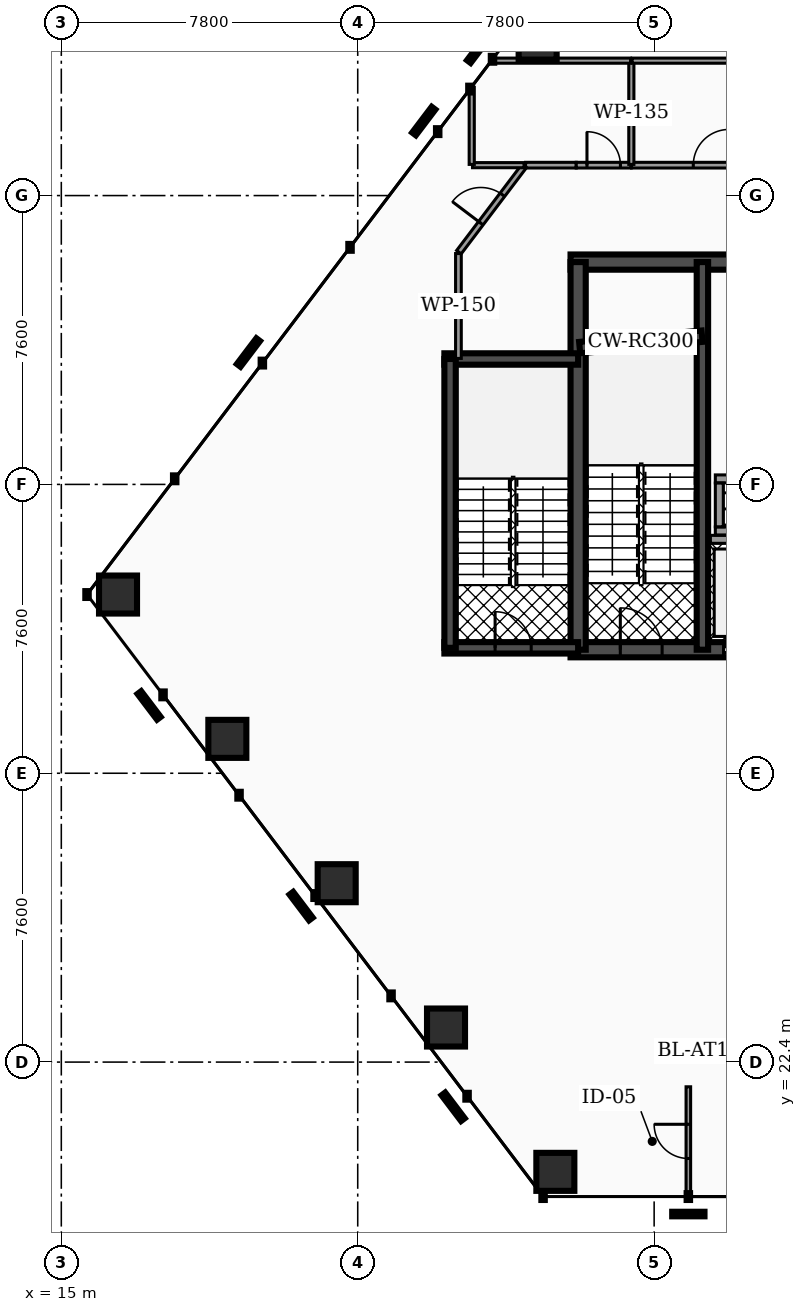
"""IFC4 building model, lengths in metres.
Left out: names, types, materials, properties, quantities, classifications, styles, units other than length and angle.
Written with IfcOpenShell. Run it as: python <this file> out.ifc"""

import sys

from ifc_helpers import new_model, si_unit, direction, frame, frame_2d, origin, origin_2d, place, context, subcontext, project, spatial, rectangle, hollow_rectangle, extrude, element, fill, save


model = new_model("IFC4")
c1 = context("Model", 3, precision=1e-05, world=origin(), true_north=direction((0.0, 1.0)))
c2 = subcontext(c1, "Body", "Model", "MODEL_VIEW")
j1 = project(units=[si_unit("LENGTHUNIT", "METRE"), si_unit("PLANEANGLEUNIT", "RADIAN")], contexts=[c1])
p1 = place(None, origin())
s1 = spatial("IfcSite", under=j1, at=p1, CompositionType="ELEMENT")
p2 = place(p1, origin())
s2 = spatial("IfcBuilding", under=s1, at=p2, CompositionType="ELEMENT")
p3 = place(p2, frame((0.0, 0.0, 56.1)))
s3 = spatial("IfcBuildingStorey", under=s2, at=p3, CompositionType="ELEMENT", Elevation=56.1)
p4 = place(p3, frame((28.4, 43.45, 0.0), z_axis=(0.0, 0.0, 1.0), x_axis=(1.0, 0.0, 0.0)))
e1 = element("IfcWall", 1, at=p4, inside=s3, PredefinedType="SHEAR", context=c2, shape_type="SweptSolid", body=[
    extrude(rectangle(XDim=20.06, YDim=0.4, at=frame_2d((10.03, 0.0))), origin(), (0.0, 0.0, 1.0), 3.82),
])
p5 = place(p3, frame((28.4, 33.25, 0.0), z_axis=(0.0, 0.0, 1.0), x_axis=(1.0, 0.0, 0.0)))
e2 = element("IfcWall", 2, at=p5, inside=s3, PredefinedType="SHEAR", context=c2, shape_type="SweptSolid", body=[
    extrude(rectangle(XDim=20.06, YDim=0.4, at=frame_2d((10.03, 0.0))), origin(), (0.0, 0.0, 1.0), 3.82),
])
p6 = place(p5, frame((4.03, 0.0, 0.0)))
e3 = element("IfcOpeningElement", 3, at=p6, cuts=e2, PredefinedType="OPENING", context=c2, shape_type="SweptSolid", body=[
    extrude(rectangle(XDim=1.1, YDim=2.15, at=frame_2d((0.55, 1.075))), frame((0.0, 0.21, 0.0), z_axis=(0.0, -1.0, 0.0), x_axis=(1.0, 0.0, 0.0)), (0.0, 0.0, 1.0), 0.42),
])
p7 = place(p5, frame((14.87, 0.0, 0.0)))
e4 = element("IfcOpeningElement", 4, at=p7, cuts=e2, PredefinedType="OPENING", context=c2, shape_type="SweptSolid", body=[
    extrude(rectangle(XDim=1.1, YDim=2.15, at=frame_2d((0.55, 1.075))), frame((0.0, 0.21, 0.0), z_axis=(0.0, -1.0, 0.0), x_axis=(1.0, 0.0, 0.0)), (0.0, 0.0, 1.0), 0.42),
])
p8 = place(p5, frame((1.31, 0.0, 0.0)))
e5 = element("IfcOpeningElement", 5, at=p8, cuts=e2, PredefinedType="OPENING", context=c2, shape_type="SweptSolid", body=[
    extrude(rectangle(XDim=1.1, YDim=2.2, at=frame_2d((0.55, 1.1))), frame((0.0, 0.21, 0.0), z_axis=(0.0, -1.0, 0.0), x_axis=(1.0, 0.0, 0.0)), (0.0, 0.0, 1.0), 0.42),
])
p9 = place(p5, frame((9.44, 0.0, 0.0)))
e6 = element("IfcOpeningElement", 6, at=p9, cuts=e2, PredefinedType="OPENING", context=c2, shape_type="SweptSolid", body=[
    extrude(rectangle(XDim=1.12, YDim=2.05, at=frame_2d((0.56, 1.025))), frame((0.0, 0.21, 0.0), z_axis=(0.0, -1.0, 0.0), x_axis=(1.0, 0.0, 0.0)), (0.0, 0.0, 1.0), 0.42),
])
p10 = place(p5, frame((17.65, 0.0, 0.0)))
e7 = element("IfcOpeningElement", 7, at=p10, cuts=e2, PredefinedType="OPENING", context=c2, shape_type="SweptSolid", body=[
    extrude(rectangle(XDim=1.1, YDim=2.2, at=frame_2d((0.55, 1.1))), frame((0.0, 0.21, 0.0), z_axis=(0.0, -1.0, 0.0), x_axis=(1.0, 0.0, 0.0)), (0.0, 0.0, 1.0), 0.42),
])
p11 = place(p3, frame((28.6, 33.25, 0.0), z_axis=(0.0, 0.0, 1.0), x_axis=(0.0, 1.0, 0.0)))
e8 = element("IfcWall", 8, at=p11, inside=s3, PredefinedType="SHEAR", context=c2, shape_type="SweptSolid", body=[
    extrude(rectangle(XDim=10.2, YDim=0.4, at=frame_2d((5.1, 0.0))), origin(), (0.0, 0.0, 1.0), 3.82),
])
p12 = place(p3, frame((31.87, 33.25, 0.0), z_axis=(0.0, 0.0, 1.0), x_axis=(0.0, 1.0, 0.0)))
e9 = element("IfcWall", 9, at=p12, inside=s3, PredefinedType="SHEAR", context=c2, shape_type="SweptSolid", body=[
    extrude(rectangle(XDim=10.2, YDim=0.3, at=frame_2d((5.1, 0.0))), origin(), (0.0, 0.0, 1.0), 3.82),
])
p13 = place(p3, frame((28.64, 41.2, 0.0), z_axis=(0.0, 0.0, 1.0), x_axis=(0.995687118776, 0.092774789157, 0.0)))
e10 = element("IfcWall", 10, at=p13, inside=s3, PredefinedType="SHEAR", context=c2, shape_type="SweptSolid", body=[
    extrude(rectangle(XDim=3.234, YDim=0.3, at=frame_2d((1.617, 0.0))), origin(), (0.0, 0.0, 1.0), 3.82),
])
p14 = place(p3, frame((25.08, 40.9, 0.0), z_axis=(0.0, 0.0, 1.0), x_axis=(1.0, 0.0, 0.0)))
e11 = element("IfcWall", 11, at=p14, inside=s3, PredefinedType="SHEAR", context=c2, shape_type="SweptSolid", body=[
    extrude(rectangle(XDim=3.52, YDim=0.3, at=frame_2d((1.76, 0.0))), origin(), (0.0, 0.0, 1.0), 3.82),
])
p15 = place(p3, frame((25.08, 33.3, 0.0), z_axis=(0.0, 0.0, 1.0), x_axis=(1.0, 0.0, 0.0)))
e12 = element("IfcWall", 12, at=p15, inside=s3, PredefinedType="SHEAR", context=c2, shape_type="SweptSolid", body=[
    extrude(rectangle(XDim=3.52, YDim=0.3, at=frame_2d((1.76, 0.0))), origin(), (0.0, 0.0, 1.0), 3.82),
])
p16 = place(p15, frame((1.335, 0.0, 0.0)))
e13 = element("IfcOpeningElement", 13, at=p16, cuts=e12, PredefinedType="OPENING", context=c2, shape_type="SweptSolid", body=[
    extrude(rectangle(XDim=0.95, YDim=2.2, at=frame_2d((0.475, 1.1))), frame((0.0, 0.16, 0.0), z_axis=(0.0, -1.0, 0.0), x_axis=(1.0, 0.0, 0.0)), (0.0, 0.0, 1.0), 0.32),
])
p17 = place(p3, frame((25.23, 33.3, 0.0), z_axis=(0.0, 0.0, 1.0), x_axis=(0.0, 1.0, 0.0)))
e14 = element("IfcWall", 14, at=p17, inside=s3, PredefinedType="SHEAR", context=c2, shape_type="SweptSolid", body=[
    extrude(rectangle(XDim=7.6, YDim=0.3, at=frame_2d((3.8, 0.0))), origin(), (0.0, 0.0, 1.0), 3.82),
])
for number, where, z_axis, x_axis in (
    (15, (27.534, 49.278, 0.0), (0.0, 0.0, 1.0), (1.0, 0.0, 0.0)),
    (16, (16.492, 34.702, 0.0), (0.0, 0.0, 1.0), (1.0, 0.0, 0.0)),
    (17, (19.369, 30.905, 0.0), (0.0, 0.0, 1.0), (1.0, 0.0, 0.0)),
    (18, (22.246, 27.107, 0.0), (0.0, 0.0, 1.0), (1.0, 0.0, 0.0)),
    (19, (25.123, 23.309, 0.0), (0.0, 0.0, 1.0), (1.0, 0.0, 0.0)),
    (20, (28.0, 19.512, 0.0), (0.0, 0.0, 1.0), (1.0, 0.0, 0.0)),
):
    element("IfcColumn", number, at=place(p3, frame(where, z_axis=z_axis, x_axis=x_axis)), inside=s3, PredefinedType="COLUMN", context=c2, shape_type="SweptSolid", body=[
        extrude(hollow_rectangle(XDim=1.0, YDim=1.0, WallThickness=0.05, at=origin_2d()), origin(), (0.0, 0.0, 1.0), 3.82),
    ])
p18 = place(p3, frame((32.08, 36.155, 0.0), z_axis=(0.0, 0.0, 1.0), x_axis=(1.0, 0.0, 0.0)))
e21 = element("IfcWall", 21, at=p18, inside=s3, PredefinedType="SOLIDWALL", context=c2, shape_type="SweptSolid", body=[
    extrude(rectangle(XDim=1.8, YDim=0.21, at=frame_2d((0.9, 0.0))), origin(), (0.0, 0.0, 1.0), 2.792),
])
for number, where, z_axis, x_axis in (
    (22, (32.21, 36.375, 0.0), (0.0, 0.0, 1.0), (1.0, 0.0, 0.0)),
    (23, (32.21, 37.745, 0.0), (0.0, 0.0, 1.0), (1.0, 0.0, 0.0)),
):
    element("IfcWall", number, at=place(p3, frame(where, z_axis=z_axis, x_axis=x_axis)), inside=s3, PredefinedType="SOLIDWALL", context=c2, shape_type="SweptSolid", body=[
        extrude(rectangle(XDim=1.6, YDim=0.21, at=frame_2d((0.8, 0.0))), origin(), (0.0, 0.0, 1.0), 3.82),
    ])
p19 = place(p3, frame((32.315, 36.485, 0.0), z_axis=(0.0, 0.0, 1.0), x_axis=(0.0, 1.0, 0.0)))
e24 = element("IfcWall", 24, at=p19, inside=s3, PredefinedType="SOLIDWALL", context=c2, shape_type="SweptSolid", body=[
    extrude(rectangle(XDim=1.15, YDim=0.21, at=frame_2d((0.575, 0.0))), origin(), (0.0, 0.0, 1.0), 3.82),
])
p20 = place(p3, frame((27.217, 46.0, 0.0), z_axis=(0.0, 0.0, 1.0), x_axis=(1.0, 0.0, 0.0)))
e25 = element("IfcWall", 25, at=p20, inside=s3, PredefinedType="PARTITIONING", context=c2, shape_type="SweptSolid", body=[
    extrude(rectangle(XDim=1.333, YDim=0.15, at=frame_2d((0.667, 0.0))), origin(), (0.0, 0.0, 1.0), 2.777),
])
p21 = place(p3, frame((28.55, 46.0, 0.0), z_axis=(0.0, 0.0, 1.0), x_axis=(1.0, 0.0, 0.0)))
e26 = element("IfcWall", 26, at=p21, inside=s3, PredefinedType="PARTITIONING", context=c2, shape_type="SweptSolid", body=[
    extrude(rectangle(XDim=1.445, YDim=0.15, at=frame_2d((0.723, 0.0))), origin(), (0.0, 0.0, 1.0), 2.777),
])
p22 = place(p21, frame((0.282, 0.0, 0.0)))
e27 = element("IfcOpeningElement", 27, at=p22, cuts=e26, PredefinedType="OPENING", context=c2, shape_type="SweptSolid", body=[
    extrude(rectangle(XDim=0.88, YDim=2.05, at=frame_2d((0.44, 1.025))), frame((0.0, 0.085, 0.0), z_axis=(0.0, -1.0, 0.0), x_axis=(1.0, 0.0, 0.0)), (0.0, 0.0, 1.0), 0.17),
])
p23 = place(p3, frame((30.005, 46.0, 0.0), z_axis=(0.0, 0.0, 1.0), x_axis=(1.0, 0.0, 0.0)))
e28 = element("IfcWall", 28, at=p23, inside=s3, PredefinedType="PARTITIONING", context=c2, shape_type="SweptSolid", body=[
    extrude(rectangle(XDim=4.19, YDim=0.15, at=frame_2d((2.095, 0.0))), origin(), (0.0, 0.0, 1.0), 2.777),
])
p24 = place(p23, frame((1.625, 0.0, 0.0)))
e29 = element("IfcOpeningElement", 29, at=p24, cuts=e28, PredefinedType="OPENING", context=c2, shape_type="SweptSolid", body=[
    extrude(rectangle(XDim=0.94, YDim=2.05, at=frame_2d((0.47, 1.025))), frame((0.0, 0.085, 0.0), z_axis=(0.0, -1.0, 0.0), x_axis=(1.0, 0.0, 0.0)), (0.0, 0.0, 1.0), 0.17),
])
p25 = place(p3, frame((25.45, 40.915, 0.0), z_axis=(0.0, 0.0, 1.0), x_axis=(0.0, 1.0, 0.0)))
e30 = element("IfcWall", 30, at=p25, inside=s3, PredefinedType="PARTITIONING", context=c2, shape_type="SweptSolid", body=[
    extrude(rectangle(XDim=2.759, YDim=0.15, at=frame_2d((1.38, 0.0))), origin(), (0.0, 0.0, 1.0), 2.777),
])
p26 = place(p3, frame((25.462, 43.71, 0.0), z_axis=(0.0, 0.0, 1.0), x_axis=(0.603800014115, 0.797135837204, 0.0)))
e31 = element("IfcWall", 31, at=p26, inside=s3, PredefinedType="PARTITIONING", context=c2, shape_type="SweptSolid", body=[
    extrude(rectangle(XDim=2.853, YDim=0.15, at=frame_2d((1.426, 0.0))), origin(), (0.0, 0.0, 1.0), 2.777),
])
p27 = place(p26, frame((0.956, 0.0, 0.0)))
e32 = element("IfcOpeningElement", 32, at=p27, cuts=e31, PredefinedType="OPENING", context=c2, shape_type="SweptSolid", body=[
    extrude(rectangle(XDim=0.94, YDim=2.05, at=frame_2d((0.47, 1.025))), frame((0.0, 0.085, 0.0), z_axis=(0.0, -1.0, 0.0), x_axis=(1.0, 0.0, 0.0)), (0.0, 0.0, 1.0), 0.17),
])
p28 = place(p3, frame((30.0, 46.02, 0.0), z_axis=(0.0, 0.0, 1.0), x_axis=(0.0, 1.0, 0.0)))
e33 = element("IfcWall", 33, at=p28, inside=s3, PredefinedType="PARTITIONING", context=c2, shape_type="SweptSolid", body=[
    extrude(rectangle(XDim=2.71, YDim=0.135, at=frame_2d((1.355, 0.0))), origin(), (0.0, 0.0, 1.0), 2.777),
])
p29 = place(p3, frame((25.82, 46.0, 0.0), z_axis=(0.0, 0.0, 1.0), x_axis=(1.0, 0.0, 0.0)))
e34 = element("IfcWall", 34, at=p29, inside=s3, PredefinedType="PARTITIONING", context=c2, shape_type="SweptSolid", body=[
    extrude(rectangle(XDim=1.356, YDim=0.135, at=frame_2d((0.678, 0.0))), origin(), (0.0, 0.0, 1.0), 2.777),
])
p30 = place(p3, frame((25.8, 46.02, 0.0), z_axis=(0.0, 0.0, 1.0), x_axis=(0.0, 1.0, 0.0)))
e35 = element("IfcWall", 35, at=p30, inside=s3, PredefinedType="PARTITIONING", context=c2, shape_type="SweptSolid", body=[
    extrude(rectangle(XDim=2.03, YDim=0.135, at=frame_2d((1.015, 0.0))), origin(), (0.0, 0.0, 1.0), 2.777),
])
p31 = place(p3, frame((26.334, 48.75, 0.0), z_axis=(0.0, 0.0, 1.0), x_axis=(1.0, 0.0, 0.0)))
e36 = element("IfcWall", 36, at=p31, inside=s3, PredefinedType="PARTITIONING", context=c2, shape_type="SweptSolid", body=[
    extrude(rectangle(XDim=3.646, YDim=0.135, at=frame_2d((1.823, 0.0))), origin(), (0.0, 0.0, 1.0), 2.777),
])
p32 = place(p3, frame((30.02, 48.75, 0.0), z_axis=(0.0, 0.0, 1.0), x_axis=(1.0, 0.0, 0.0)))
e37 = element("IfcWall", 37, at=p32, inside=s3, PredefinedType="PARTITIONING", context=c2, shape_type="SweptSolid", body=[
    extrude(rectangle(XDim=4.16, YDim=0.135, at=frame_2d((2.08, 0.0))), origin(), (0.0, 0.0, 1.0), 2.777),
])
p33 = place(p3, frame((31.5, 18.877, 0.0), z_axis=(0.0, 0.0, 1.0), x_axis=(0.0, 1.0, 0.0)))
e38 = element("IfcWall", 38, at=p33, inside=s3, PredefinedType="PARTITIONING", context=c2, shape_type="SweptSolid", body=[
    extrude(rectangle(XDim=2.873, YDim=0.12, at=frame_2d((1.437, 0.0))), origin(), (0.0, 0.0, 1.0), 2.777),
])
p34 = place(p33, frame((0.987, 0.0, 0.0)))
e39 = element("IfcOpeningElement", 39, at=p34, cuts=e38, PredefinedType="OPENING", context=c2, shape_type="SweptSolid", body=[
    extrude(rectangle(XDim=0.9, YDim=2.05, at=frame_2d((0.45, 1.025))), frame((0.0, 0.07, 0.0), z_axis=(0.0, -1.0, 0.0), x_axis=(1.0, 0.0, 0.0)), (0.0, 0.0, 1.0), 0.14),
])
p35 = place(p6, origin())
e40 = element("IfcDoor", 40, at=p35, inside=s3, OperationType="SLIDING_TO_LEFT", PredefinedType="DOOR", context=c2, shape_type="SweptSolid", body=[
    extrude(rectangle(XDim=1.1, YDim=2.15, at=frame_2d((0.55, 1.075))), frame((0.0, 0.025, 0.0), z_axis=(0.0, -1.0, 0.0), x_axis=(1.0, 0.0, 0.0)), (0.0, 0.0, 1.0), 0.05),
])
fill(e3, e40)
p36 = place(p8, origin())
e41 = element("IfcDoor", 41, at=p36, inside=s3, OperationType="SINGLE_SWING_LEFT", PredefinedType="DOOR", context=c2, shape_type="SweptSolid", body=[
    extrude(rectangle(XDim=1.1, YDim=2.2, at=frame_2d((0.55, 1.1))), frame((0.0, 0.025, 0.0), z_axis=(0.0, -1.0, 0.0), x_axis=(1.0, 0.0, 0.0)), (0.0, 0.0, 1.0), 0.05),
])
fill(e5, e41)
p37 = place(p16, origin())
e42 = element("IfcDoor", 42, at=p37, inside=s3, OperationType="SINGLE_SWING_LEFT", PredefinedType="DOOR", context=c2, shape_type="SweptSolid", body=[
    extrude(rectangle(XDim=0.95, YDim=2.2, at=frame_2d((0.475, 1.1))), frame((0.0, 0.025, 0.0), z_axis=(0.0, -1.0, 0.0), x_axis=(1.0, 0.0, 0.0)), (0.0, 0.0, 1.0), 0.05),
])
fill(e13, e42)
p38 = place(p22, origin())
e43 = element("IfcDoor", 43, at=p38, inside=s3, OperationType="SINGLE_SWING_LEFT", PredefinedType="DOOR", context=c2, shape_type="SweptSolid", body=[
    extrude(rectangle(XDim=0.88, YDim=2.05, at=frame_2d((0.44, 1.025))), frame((0.0, 0.025, 0.0), z_axis=(0.0, -1.0, 0.0), x_axis=(1.0, 0.0, 0.0)), (0.0, 0.0, 1.0), 0.05),
])
fill(e27, e43)
p39 = place(p24, origin())
e44 = element("IfcDoor", 44, at=p39, inside=s3, OperationType="SINGLE_SWING_RIGHT", PredefinedType="DOOR", context=c2, shape_type="SweptSolid", body=[
    extrude(rectangle(XDim=0.94, YDim=2.05, at=frame_2d((0.47, 1.025))), frame((0.0, 0.025, 0.0), z_axis=(0.0, -1.0, 0.0), x_axis=(1.0, 0.0, 0.0)), (0.0, 0.0, 1.0), 0.05),
])
fill(e29, e44)
p40 = place(p27, origin())
e45 = element("IfcDoor", 45, at=p40, inside=s3, OperationType="SINGLE_SWING_LEFT", PredefinedType="DOOR", context=c2, shape_type="SweptSolid", body=[
    extrude(rectangle(XDim=0.94, YDim=2.05, at=frame_2d((0.47, 1.025))), frame((0.0, 0.025, 0.0), z_axis=(0.0, -1.0, 0.0), x_axis=(1.0, 0.0, 0.0)), (0.0, 0.0, 1.0), 0.05),
])
fill(e32, e45)
p41 = place(p34, origin())
e46 = element("IfcDoor", 46, at=p41, inside=s3, OperationType="SINGLE_SWING_RIGHT", PredefinedType="DOOR", context=c2, shape_type="SweptSolid", body=[
    extrude(rectangle(XDim=0.9, YDim=2.05, at=frame_2d((0.45, 1.025))), frame((0.0, 0.025, 0.0), z_axis=(0.0, -1.0, 0.0), x_axis=(1.0, 0.0, 0.0)), (0.0, 0.0, 1.0), 0.05),
])
fill(e39, e46)
save(model, sys.argv[1])
